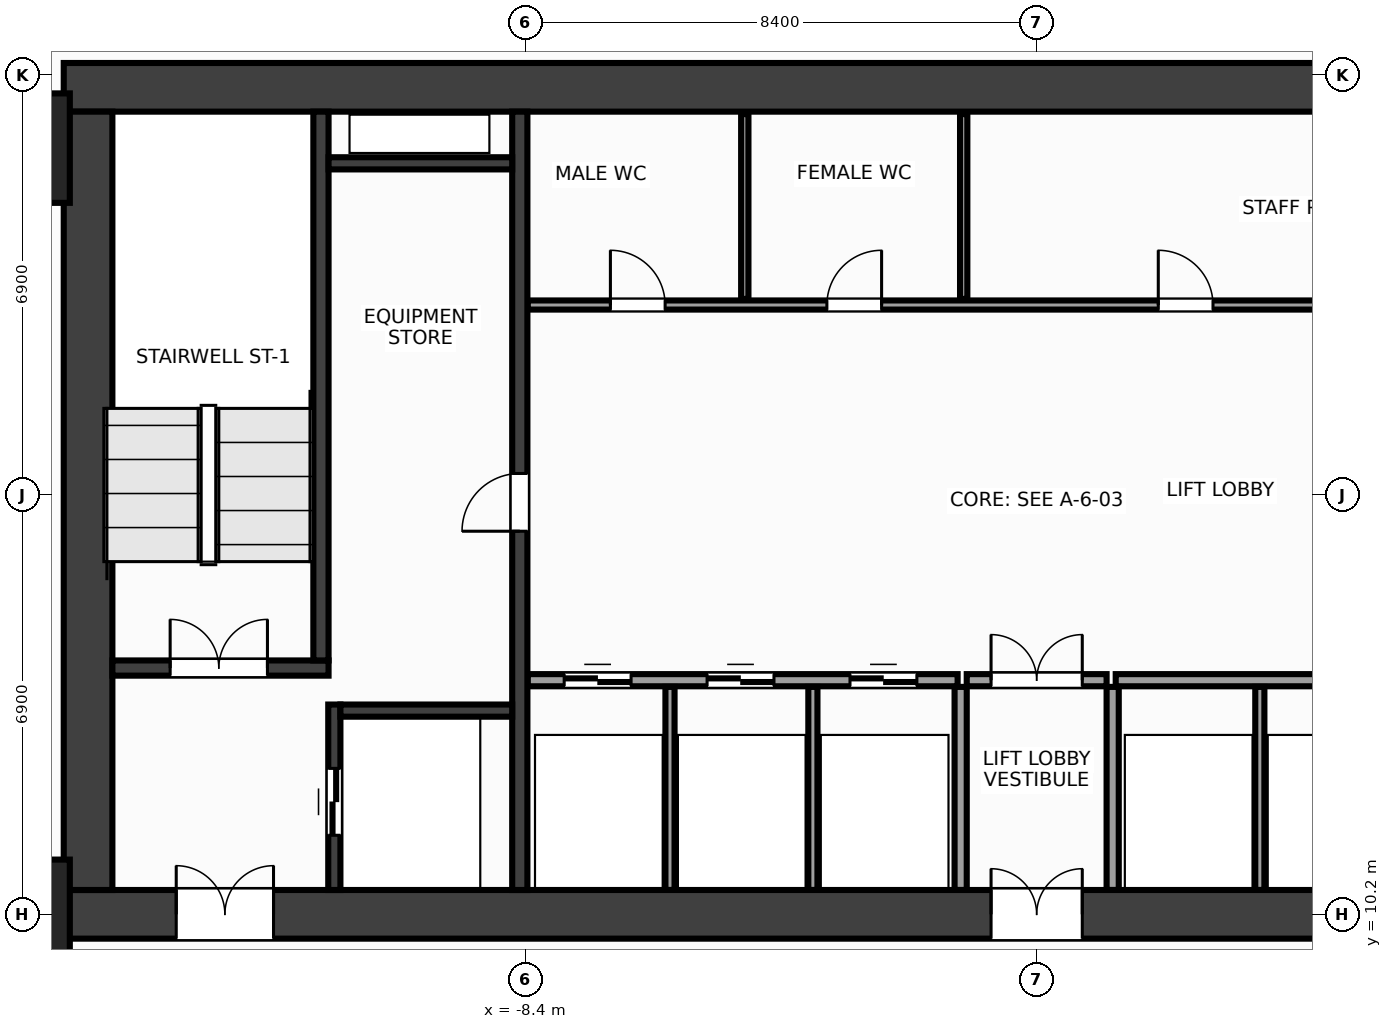
"""IFC4 building model, lengths in metres.
Left out: names, types, materials, properties, quantities, classifications, styles, units other than length and angle.
Written with IfcOpenShell. Run it as: python <this file> out.ifc"""

import sys

from ifc_helpers import new_model, si_unit, direction, frame, frame_2d, origin, origin_2d, place, context, subcontext, project, spatial, rectangle, extrude, source, transform, mapped, element, fill, save


model = new_model("IFC4")
c1 = context("Model", 3, precision=1e-05, world=origin(), true_north=direction((0.0, 1.0)))
c2 = subcontext(c1, "Body", "Model", "MODEL_VIEW")
j1 = project(units=[si_unit("LENGTHUNIT", "METRE"), si_unit("PLANEANGLEUNIT", "RADIAN")], contexts=[c1])
p1 = place(None, origin())
s1 = spatial("IfcSite", under=j1, at=p1, CompositionType="ELEMENT")
p2 = place(p1, origin())
s2 = spatial("IfcBuilding", under=s1, at=p2, CompositionType="ELEMENT")
p3 = place(p2, frame((0.0, 0.0, 66.8)))
s3 = spatial("IfcBuildingStorey", under=s2, at=p3, CompositionType="ELEMENT", Elevation=66.8)
m1 = source(origin(), c2, "Body", "SweptSolid", [
    extrude(rectangle(XDim=32.0, YDim=0.8, at=frame_2d((16.0, 0.0))), origin(), (0.0, 0.0, 1.0), 3.6),
])
p4 = place(p3, frame((-16.0, 23.8, 0.0), z_axis=(0.0, 0.0, 1.0), x_axis=(1.0, 0.0, 0.0)))
e1 = element("IfcWall", 1, at=p4, inside=s3, PredefinedType="SHEAR", context=c2, shape_type="MappedRepresentation", body=[
    mapped(m1, transform((0.0, 0.0, 0.0), x_axis=(1.0, 0.0, 0.0), y_axis=(0.0, 1.0, 0.0), z_axis=(0.0, 0.0, 1.0), scale=1.0)),
])
p5 = place(p3, frame((-16.0, 10.2, 0.0), z_axis=(0.0, 0.0, 1.0), x_axis=(1.0, 0.0, 0.0)))
e2 = element("IfcWall", 2, at=p5, inside=s3, PredefinedType="SHEAR", context=c2, shape_type="MappedRepresentation", body=[
    mapped(m1, transform((0.0, 0.0, 0.0), x_axis=(1.0, 0.0, 0.0), y_axis=(0.0, 1.0, 0.0), z_axis=(0.0, 0.0, 1.0), scale=1.0)),
])
p6 = place(p5, frame((1.85, 0.0, 0.0)))
e3 = element("IfcOpeningElement", 3, at=p6, cuts=e2, PredefinedType="OPENING", context=c2, shape_type="SweptSolid", body=[
    extrude(rectangle(XDim=1.6, YDim=2.15, at=frame_2d((0.8, 1.075))), frame((0.0, 0.412, 0.0), z_axis=(0.0, -1.0, 0.0), x_axis=(1.0, 0.0, 0.0)), (0.0, 0.0, 1.0), 0.824),
])
p7 = place(p5, frame((28.55, 0.0, 0.0)))
e4 = element("IfcOpeningElement", 4, at=p7, cuts=e2, PredefinedType="OPENING", context=c2, shape_type="SweptSolid", body=[
    extrude(rectangle(XDim=1.6, YDim=2.15, at=frame_2d((0.8, 1.075))), frame((0.0, 0.412, 0.0), z_axis=(0.0, -1.0, 0.0), x_axis=(1.0, 0.0, 0.0)), (0.0, 0.0, 1.0), 0.824),
])
p8 = place(p5, frame((15.25, 0.0, 0.0)))
e5 = element("IfcOpeningElement", 5, at=p8, cuts=e2, PredefinedType="OPENING", context=c2, shape_type="SweptSolid", body=[
    extrude(rectangle(XDim=1.5, YDim=2.2, at=frame_2d((0.75, 1.1))), frame((0.0, 0.412, 0.0), z_axis=(0.0, -1.0, 0.0), x_axis=(1.0, 0.0, 0.0)), (0.0, 0.0, 1.0), 0.824),
])
m2 = source(origin(), c2, "Body", "SweptSolid", [
    extrude(rectangle(XDim=12.8, YDim=0.8, at=frame_2d((6.4, 0.0))), origin(), (0.0, 0.0, 1.0), 3.6),
])
p9 = place(p3, frame((-15.6, 10.6, 0.0), z_axis=(0.0, 0.0, 1.0), x_axis=(0.0, 1.0, 0.0)))
e6 = element("IfcWall", 6, at=p9, inside=s3, PredefinedType="SHEAR", context=c2, shape_type="MappedRepresentation", body=[
    mapped(m2, transform((0.0, 0.0, 0.0), x_axis=(1.0, 0.0, 0.0), y_axis=(0.0, 1.0, 0.0), z_axis=(0.0, 0.0, 1.0), scale=1.0)),
])
m3 = source(origin(), c2, "Body", "SweptSolid", [
    extrude(rectangle(XDim=12.8, YDim=0.25, at=frame_2d((6.4, 0.0))), origin(), (0.0, 0.0, 1.0), 3.6),
])
p10 = place(p3, frame((-8.5, 10.6, 0.0), z_axis=(0.0, 0.0, 1.0), x_axis=(0.0, 1.0, 0.0)))
e7 = element("IfcWall", 7, at=p10, inside=s3, PredefinedType="SHEAR", context=c2, shape_type="MappedRepresentation", body=[
    mapped(m3, transform((0.0, 0.0, 0.0), x_axis=(1.0, 0.0, 0.0), y_axis=(0.0, 1.0, 0.0), z_axis=(0.0, 0.0, 1.0), scale=1.0)),
])
p11 = place(p10, frame((5.9, 0.0, 0.0)))
e8 = element("IfcOpeningElement", 8, at=p11, cuts=e7, PredefinedType="OPENING", context=c2, shape_type="SweptSolid", body=[
    extrude(rectangle(XDim=0.95, YDim=2.15, at=frame_2d((0.475, 1.075))), frame((0.0, 0.137, 0.0), z_axis=(0.0, -1.0, 0.0), x_axis=(1.0, 0.0, 0.0)), (0.0, 0.0, 1.0), 0.274),
])
m4 = source(origin(), c2, "Body", "SweptSolid", [
    extrude(rectangle(XDim=3.555, YDim=0.25, at=frame_2d((1.777, 0.0))), origin(), (0.0, 0.0, 1.0), 3.6),
])
p12 = place(p3, frame((-15.2, 14.25, 0.0), z_axis=(0.0, 0.0, 1.0), x_axis=(1.0, 0.0, 0.0)))
e9 = element("IfcWall", 9, at=p12, inside=s3, PredefinedType="SHEAR", context=c2, shape_type="MappedRepresentation", body=[
    mapped(m4, transform((0.0, 0.0, 0.0), x_axis=(1.0, 0.0, 0.0), y_axis=(0.0, 1.0, 0.0), z_axis=(0.0, 0.0, 1.0), scale=1.0)),
])
p13 = place(p12, frame((0.95, 0.0, 0.0)))
e10 = element("IfcOpeningElement", 10, at=p13, cuts=e9, PredefinedType="OPENING", context=c2, shape_type="SweptSolid", body=[
    extrude(rectangle(XDim=1.6, YDim=2.15, at=frame_2d((0.8, 1.075))), frame((0.0, 0.137, 0.0), z_axis=(0.0, -1.0, 0.0), x_axis=(1.0, 0.0, 0.0)), (0.0, 0.0, 1.0), 0.274),
])
m5 = source(origin(), c2, "Body", "SweptSolid", [
    extrude(rectangle(XDim=9.025, YDim=0.25, at=frame_2d((4.512, 0.0))), origin(), (0.0, 0.0, 1.0), 3.6),
])
p14 = place(p3, frame((-11.77, 14.375, 0.0), z_axis=(0.0, 0.0, 1.0), x_axis=(0.0, 1.0, 0.0)))
e11 = element("IfcWall", 11, at=p14, inside=s3, PredefinedType="SHEAR", context=c2, shape_type="MappedRepresentation", body=[
    mapped(m5, transform((0.0, 0.0, 0.0), x_axis=(1.0, 0.0, 0.0), y_axis=(0.0, 1.0, 0.0), z_axis=(0.0, 0.0, 1.0), scale=1.0)),
])
m6 = source(origin(), c2, "Body", "SweptSolid", [
    extrude(rectangle(XDim=3.05, YDim=0.2, at=frame_2d((1.525, 0.0))), origin(), (0.0, 0.0, 1.0), 3.6),
])
p15 = place(p3, frame((-11.55, 10.6, 0.0), z_axis=(0.0, 0.0, 1.0), x_axis=(0.0, 1.0, 0.0)))
e12 = element("IfcWall", 12, at=p15, inside=s3, PredefinedType="SHEAR", context=c2, shape_type="MappedRepresentation", body=[
    mapped(m6, transform((0.0, 0.0, 0.0), x_axis=(1.0, 0.0, 0.0), y_axis=(0.0, 1.0, 0.0), z_axis=(0.0, 0.0, 1.0), scale=1.0)),
])
p16 = place(p15, frame((0.9, 0.0, 0.0)))
e13 = element("IfcOpeningElement", 13, at=p16, cuts=e12, PredefinedType="OPENING", context=c2, shape_type="SweptSolid", body=[
    extrude(rectangle(XDim=1.1, YDim=2.15, at=frame_2d((0.55, 1.075))), frame((0.0, 0.112, 0.0), z_axis=(0.0, -1.0, 0.0), x_axis=(1.0, 0.0, 0.0)), (0.0, 0.0, 1.0), 0.224),
])
m7 = source(origin(), c2, "Body", "SweptSolid", [
    extrude(rectangle(XDim=2.825, YDim=0.2, at=frame_2d((1.413, 0.0))), origin(), (0.0, 0.0, 1.0), 3.6),
])
p17 = place(p3, frame((-11.45, 13.55, 0.0), z_axis=(0.0, 0.0, 1.0), x_axis=(1.0, 0.0, 0.0)))
e14 = element("IfcWall", 14, at=p17, inside=s3, PredefinedType="SHEAR", context=c2, shape_type="MappedRepresentation", body=[
    mapped(m7, transform((0.0, 0.0, 0.0), x_axis=(1.0, 0.0, 0.0), y_axis=(0.0, 1.0, 0.0), z_axis=(0.0, 0.0, 1.0), scale=1.0)),
])
m8 = source(origin(), c2, "Body", "SweptSolid", [
    extrude(rectangle(XDim=3.02, YDim=0.2, at=frame_2d((1.51, 0.0))), origin(), (0.0, 0.0, 1.0), 3.6),
])
p18 = place(p3, frame((-11.645, 22.55, 0.0), z_axis=(0.0, 0.0, 1.0), x_axis=(1.0, 0.0, 0.0)))
e15 = element("IfcWall", 15, at=p18, inside=s3, PredefinedType="SHEAR", context=c2, shape_type="MappedRepresentation", body=[
    mapped(m8, transform((0.0, 0.0, 0.0), x_axis=(1.0, 0.0, 0.0), y_axis=(0.0, 1.0, 0.0), z_axis=(0.0, 0.0, 1.0), scale=1.0)),
])
m9 = source(origin(), c2, "Body", "SweptSolid", [
    extrude(rectangle(XDim=1.8, YDim=1.8, at=origin_2d()), origin(), (0.0, 0.0, 1.0), 3.6),
])
for number, where, z_axis, x_axis in (
    (16, (-16.8, 10.2, 0.0), (0.0, 0.0, 1.0), (1.0, 0.0, 0.0)),
    (17, (-16.8, 22.8, 0.0), (0.0, 0.0, 1.0), (1.0, 0.0, 0.0)),
):
    element("IfcColumn", number, at=place(p3, frame(where, z_axis=z_axis, x_axis=x_axis)), inside=s3, PredefinedType="COLUMN", context=c2, shape_type="MappedRepresentation", body=[
        mapped(m9, transform((0.0, 0.0, 0.0), x_axis=(1.0, 0.0, 0.0), y_axis=(0.0, 1.0, 0.0), z_axis=(0.0, 0.0, 1.0), scale=1.0)),
    ])
m10 = source(origin(), c2, "Body", "SweptSolid", [
    extrude(rectangle(XDim=7.07, YDim=0.2, at=frame_2d((3.535, 0.0))), origin(), (0.0, 0.0, 1.0), 3.3),
])
p19 = place(p3, frame((-8.37, 14.05, 0.0), z_axis=(0.0, 0.0, 1.0), x_axis=(1.0, 0.0, 0.0)))
e18 = element("IfcWall", 18, at=p19, inside=s3, PredefinedType="PARTITIONING", context=c2, shape_type="MappedRepresentation", body=[
    mapped(m10, transform((0.0, 0.0, 0.0), x_axis=(1.0, 0.0, 0.0), y_axis=(0.0, 1.0, 0.0), z_axis=(0.0, 0.0, 1.0), scale=1.0)),
])
p20 = place(p19, frame((0.6, 0.0, 0.0)))
e19 = element("IfcOpeningElement", 19, at=p20, cuts=e18, PredefinedType="OPENING", context=c2, shape_type="SweptSolid", body=[
    extrude(rectangle(XDim=1.1, YDim=2.15, at=frame_2d((0.55, 1.075))), frame((0.0, 0.112, 0.0), z_axis=(0.0, -1.0, 0.0), x_axis=(1.0, 0.0, 0.0)), (0.0, 0.0, 1.0), 0.224),
])
p21 = place(p19, frame((2.95, 0.0, 0.0)))
e20 = element("IfcOpeningElement", 20, at=p21, cuts=e18, PredefinedType="OPENING", context=c2, shape_type="SweptSolid", body=[
    extrude(rectangle(XDim=1.1, YDim=2.15, at=frame_2d((0.55, 1.075))), frame((0.0, 0.112, 0.0), z_axis=(0.0, -1.0, 0.0), x_axis=(1.0, 0.0, 0.0)), (0.0, 0.0, 1.0), 0.224),
])
p22 = place(p19, frame((5.3, 0.0, 0.0)))
e21 = element("IfcOpeningElement", 21, at=p22, cuts=e18, PredefinedType="OPENING", context=c2, shape_type="SweptSolid", body=[
    extrude(rectangle(XDim=1.1, YDim=2.15, at=frame_2d((0.55, 1.075))), frame((0.0, 0.112, 0.0), z_axis=(0.0, -1.0, 0.0), x_axis=(1.0, 0.0, 0.0)), (0.0, 0.0, 1.0), 0.224),
])
p23 = place(p3, frame((1.3, 14.05, 0.0), z_axis=(0.0, 0.0, 1.0), x_axis=(1.0, 0.0, 0.0)))
e22 = element("IfcWall", 22, at=p23, inside=s3, PredefinedType="PARTITIONING", context=c2, shape_type="MappedRepresentation", body=[
    mapped(m10, transform((0.0, 0.0, 0.0), x_axis=(1.0, 0.0, 0.0), y_axis=(0.0, 1.0, 0.0), z_axis=(0.0, 0.0, 1.0), scale=1.0)),
])
m11 = source(origin(), c2, "Body", "SweptSolid", [
    extrude(rectangle(XDim=3.34, YDim=0.2, at=frame_2d((1.67, 0.0))), origin(), (0.0, 0.0, 1.0), 3.3),
])
for number, where, z_axis, x_axis in (
    (23, (-1.25, 10.6, 0.0), (0.0, 0.0, 1.0), (0.0, 1.0, 0.0)),
    (24, (1.25, 10.6, 0.0), (0.0, 0.0, 1.0), (0.0, 1.0, 0.0)),
):
    element("IfcWall", number, at=place(p3, frame(where, z_axis=z_axis, x_axis=x_axis)), inside=s3, PredefinedType="PARTITIONING", context=c2, shape_type="MappedRepresentation", body=[
        mapped(m11, transform((0.0, 0.0, 0.0), x_axis=(1.0, 0.0, 0.0), y_axis=(0.0, 1.0, 0.0), z_axis=(0.0, 0.0, 1.0), scale=1.0)),
    ])
m12 = source(origin(), c2, "Body", "SweptSolid", [
    extrude(rectangle(XDim=2.3, YDim=0.2, at=frame_2d((1.15, 0.0))), origin(), (0.0, 0.0, 1.0), 3.3),
])
p24 = place(p3, frame((-1.15, 14.05, 0.0), z_axis=(0.0, 0.0, 1.0), x_axis=(1.0, 0.0, 0.0)))
e25 = element("IfcWall", 25, at=p24, inside=s3, PredefinedType="PARTITIONING", context=c2, shape_type="MappedRepresentation", body=[
    mapped(m12, transform((0.0, 0.0, 0.0), x_axis=(1.0, 0.0, 0.0), y_axis=(0.0, 1.0, 0.0), z_axis=(0.0, 0.0, 1.0), scale=1.0)),
])
p25 = place(p24, frame((0.4, 0.0, 0.0)))
e26 = element("IfcOpeningElement", 26, at=p25, cuts=e25, PredefinedType="OPENING", context=c2, shape_type="SweptSolid", body=[
    extrude(rectangle(XDim=1.5, YDim=2.2, at=frame_2d((0.75, 1.1))), frame((0.0, 0.112, 0.0), z_axis=(0.0, -1.0, 0.0), x_axis=(1.0, 0.0, 0.0)), (0.0, 0.0, 1.0), 0.224),
])
m13 = source(origin(), c2, "Body", "SweptSolid", [
    extrude(rectangle(XDim=14.59, YDim=0.15, at=frame_2d((7.295, 0.0))), origin(), (0.0, 0.0, 1.0), 3.3),
])
p26 = place(p3, frame((-8.37, 20.22, 0.0), z_axis=(0.0, 0.0, 1.0), x_axis=(1.0, 0.0, 0.0)))
e27 = element("IfcWall", 27, at=p26, inside=s3, PredefinedType="PARTITIONING", context=c2, shape_type="MappedRepresentation", body=[
    mapped(m13, transform((0.0, 0.0, 0.0), x_axis=(1.0, 0.0, 0.0), y_axis=(0.0, 1.0, 0.0), z_axis=(0.0, 0.0, 1.0), scale=1.0)),
])
p27 = place(p26, frame((1.36, 0.0, 0.0)))
e28 = element("IfcOpeningElement", 28, at=p27, cuts=e27, PredefinedType="OPENING", context=c2, shape_type="SweptSolid", body=[
    extrude(rectangle(XDim=0.9, YDim=2.15, at=frame_2d((0.45, 1.075))), frame((0.0, 0.087, 0.0), z_axis=(0.0, -1.0, 0.0), x_axis=(1.0, 0.0, 0.0)), (0.0, 0.0, 1.0), 0.174),
])
p28 = place(p26, frame((4.92, 0.0, 0.0)))
e29 = element("IfcOpeningElement", 29, at=p28, cuts=e27, PredefinedType="OPENING", context=c2, shape_type="SweptSolid", body=[
    extrude(rectangle(XDim=0.9, YDim=2.15, at=frame_2d((0.45, 1.075))), frame((0.0, 0.087, 0.0), z_axis=(0.0, -1.0, 0.0), x_axis=(1.0, 0.0, 0.0)), (0.0, 0.0, 1.0), 0.174),
])
p29 = place(p26, frame((10.37, 0.0, 0.0)))
e30 = element("IfcOpeningElement", 30, at=p29, cuts=e27, PredefinedType="OPENING", context=c2, shape_type="SweptSolid", body=[
    extrude(rectangle(XDim=0.9, YDim=2.15, at=frame_2d((0.45, 1.075))), frame((0.0, 0.087, 0.0), z_axis=(0.0, -1.0, 0.0), x_axis=(1.0, 0.0, 0.0)), (0.0, 0.0, 1.0), 0.174),
])
m14 = source(origin(), c2, "Body", "SweptSolid", [
    extrude(rectangle(XDim=3.34, YDim=0.15, at=frame_2d((1.67, 0.0))), origin(), (0.0, 0.0, 1.0), 3.3),
])
for number, where, z_axis, x_axis in (
    (31, (-6.03, 10.6, 0.0), (0.0, 0.0, 1.0), (0.0, 1.0, 0.0)),
    (32, (-3.68, 10.6, 0.0), (0.0, 0.0, 1.0), (0.0, 1.0, 0.0)),
    (33, (3.67, 10.6, 0.0), (0.0, 0.0, 1.0), (0.0, 1.0, 0.0)),
):
    element("IfcWall", number, at=place(p3, frame(where, z_axis=z_axis, x_axis=x_axis)), inside=s3, PredefinedType="PARTITIONING", context=c2, shape_type="MappedRepresentation", body=[
        mapped(m14, transform((0.0, 0.0, 0.0), x_axis=(1.0, 0.0, 0.0), y_axis=(0.0, 1.0, 0.0), z_axis=(0.0, 0.0, 1.0), scale=1.0)),
    ])
m15 = source(origin(), c2, "Body", "SweptSolid", [
    extrude(rectangle(XDim=3.04, YDim=0.12, at=frame_2d((1.52, 0.0))), origin(), (0.0, 0.0, 1.0), 3.3),
])
for number, where, z_axis, x_axis in (
    (34, (-4.8, 20.32, 0.0), (0.0, 0.0, 1.0), (0.0, 1.0, 0.0)),
    (35, (-1.2, 20.32, 0.0), (0.0, 0.0, 1.0), (0.0, 1.0, 0.0)),
):
    element("IfcWall", number, at=place(p3, frame(where, z_axis=z_axis, x_axis=x_axis)), inside=s3, PredefinedType="PARTITIONING", context=c2, shape_type="MappedRepresentation", body=[
        mapped(m15, transform((0.0, 0.0, 0.0), x_axis=(1.0, 0.0, 0.0), y_axis=(0.0, 1.0, 0.0), z_axis=(0.0, 0.0, 1.0), scale=1.0)),
    ])
m16 = source(origin(), c2, "Body", "SweptSolid", [
    extrude(rectangle(XDim=1.6, YDim=2.15, at=frame_2d((0.8, 1.075))), frame((0.0, 0.025, 0.0), z_axis=(0.0, -1.0, 0.0), x_axis=(1.0, 0.0, 0.0)), (0.0, 0.0, 1.0), 0.05),
])
p30 = place(p13, origin())
e36 = element("IfcDoor", 36, at=p30, inside=s3, OperationType="DOUBLE_DOOR_SINGLE_SWING", PredefinedType="DOOR", context=c2, shape_type="MappedRepresentation", body=[
    mapped(m16, transform((0.0, 0.0, 0.0), x_axis=(1.0, 0.0, 0.0), y_axis=(0.0, 1.0, 0.0), z_axis=(0.0, 0.0, 1.0), scale=1.0)),
])
fill(e10, e36)
p31 = place(p6, origin())
e37 = element("IfcDoor", 37, at=p31, inside=s3, OperationType="DOUBLE_DOOR_SINGLE_SWING", PredefinedType="DOOR", context=c2, shape_type="MappedRepresentation", body=[
    mapped(m16, transform((0.0, 0.0, 0.0), x_axis=(1.0, 0.0, 0.0), y_axis=(0.0, 1.0, 0.0), z_axis=(0.0, 0.0, 1.0), scale=1.0)),
])
fill(e3, e37)
m17 = source(origin(), c2, "Body", "SweptSolid", [
    extrude(rectangle(XDim=1.1, YDim=2.15, at=frame_2d((0.55, 1.075))), frame((0.0, 0.025, 0.0), z_axis=(0.0, -1.0, 0.0), x_axis=(1.0, 0.0, 0.0)), (0.0, 0.0, 1.0), 0.05),
])
p32 = place(p16, origin())
e38 = element("IfcDoor", 38, at=p32, inside=s3, OperationType="DOUBLE_DOOR_SLIDING", PredefinedType="DOOR", context=c2, shape_type="MappedRepresentation", body=[
    mapped(m17, transform((0.0, 0.0, 0.0), x_axis=(1.0, 0.0, 0.0), y_axis=(0.0, 1.0, 0.0), z_axis=(0.0, 0.0, 1.0), scale=1.0)),
])
fill(e13, e38)
m18 = source(origin(), c2, "Body", "SweptSolid", [
    extrude(rectangle(XDim=0.95, YDim=2.15, at=frame_2d((0.475, 1.075))), frame((0.0, 0.025, 0.0), z_axis=(0.0, -1.0, 0.0), x_axis=(1.0, 0.0, 0.0)), (0.0, 0.0, 1.0), 0.05),
])
p33 = place(p11, origin())
e39 = element("IfcDoor", 39, at=p33, inside=s3, OperationType="SINGLE_SWING_LEFT", PredefinedType="DOOR", context=c2, shape_type="MappedRepresentation", body=[
    mapped(m18, transform((0.0, 0.0, 0.0), x_axis=(1.0, 0.0, 0.0), y_axis=(0.0, 1.0, 0.0), z_axis=(0.0, 0.0, 1.0), scale=1.0)),
])
fill(e8, e39)
p34 = place(p20, origin())
e40 = element("IfcDoor", 40, at=p34, inside=s3, OperationType="DOUBLE_DOOR_SLIDING", PredefinedType="DOOR", context=c2, shape_type="MappedRepresentation", body=[
    mapped(m17, transform((0.0, 0.0, 0.0), x_axis=(1.0, 0.0, 0.0), y_axis=(0.0, 1.0, 0.0), z_axis=(0.0, 0.0, 1.0), scale=1.0)),
])
fill(e19, e40)
p35 = place(p21, origin())
e41 = element("IfcDoor", 41, at=p35, inside=s3, OperationType="DOUBLE_DOOR_SLIDING", PredefinedType="DOOR", context=c2, shape_type="MappedRepresentation", body=[
    mapped(m17, transform((0.0, 0.0, 0.0), x_axis=(1.0, 0.0, 0.0), y_axis=(0.0, 1.0, 0.0), z_axis=(0.0, 0.0, 1.0), scale=1.0)),
])
fill(e20, e41)
p36 = place(p22, origin())
e42 = element("IfcDoor", 42, at=p36, inside=s3, OperationType="DOUBLE_DOOR_SLIDING", PredefinedType="DOOR", context=c2, shape_type="MappedRepresentation", body=[
    mapped(m17, transform((0.0, 0.0, 0.0), x_axis=(1.0, 0.0, 0.0), y_axis=(0.0, 1.0, 0.0), z_axis=(0.0, 0.0, 1.0), scale=1.0)),
])
fill(e21, e42)
m19 = source(origin(), c2, "Body", "SweptSolid", [
    extrude(rectangle(XDim=1.5, YDim=2.2, at=frame_2d((0.75, 1.1))), frame((0.0, 0.025, 0.0), z_axis=(0.0, -1.0, 0.0), x_axis=(1.0, 0.0, 0.0)), (0.0, 0.0, 1.0), 0.05),
])
p37 = place(p25, origin())
e43 = element("IfcDoor", 43, at=p37, inside=s3, OperationType="DOUBLE_DOOR_SINGLE_SWING", PredefinedType="DOOR", context=c2, shape_type="MappedRepresentation", body=[
    mapped(m19, transform((0.0, 0.0, 0.0), x_axis=(1.0, 0.0, 0.0), y_axis=(0.0, 1.0, 0.0), z_axis=(0.0, 0.0, 1.0), scale=1.0)),
])
fill(e26, e43)
p38 = place(p8, origin())
e44 = element("IfcDoor", 44, at=p38, inside=s3, OperationType="DOUBLE_DOOR_SINGLE_SWING", PredefinedType="DOOR", context=c2, shape_type="MappedRepresentation", body=[
    mapped(m19, transform((0.0, 0.0, 0.0), x_axis=(1.0, 0.0, 0.0), y_axis=(0.0, 1.0, 0.0), z_axis=(0.0, 0.0, 1.0), scale=1.0)),
])
fill(e5, e44)
m20 = source(origin(), c2, "Body", "SweptSolid", [
    extrude(rectangle(XDim=0.9, YDim=2.15, at=frame_2d((0.45, 1.075))), frame((0.0, 0.025, 0.0), z_axis=(0.0, -1.0, 0.0), x_axis=(1.0, 0.0, 0.0)), (0.0, 0.0, 1.0), 0.05),
])
p39 = place(p27, origin())
e45 = element("IfcDoor", 45, at=p39, inside=s3, OperationType="SINGLE_SWING_LEFT", PredefinedType="DOOR", context=c2, shape_type="MappedRepresentation", body=[
    mapped(m20, transform((0.0, 0.0, 0.0), x_axis=(1.0, 0.0, 0.0), y_axis=(0.0, 1.0, 0.0), z_axis=(0.0, 0.0, 1.0), scale=1.0)),
])
fill(e28, e45)
p40 = place(p28, origin())
e46 = element("IfcDoor", 46, at=p40, inside=s3, OperationType="SINGLE_SWING_RIGHT", PredefinedType="DOOR", context=c2, shape_type="MappedRepresentation", body=[
    mapped(m20, transform((0.0, 0.0, 0.0), x_axis=(1.0, 0.0, 0.0), y_axis=(0.0, 1.0, 0.0), z_axis=(0.0, 0.0, 1.0), scale=1.0)),
])
fill(e29, e46)
p41 = place(p29, origin())
e47 = element("IfcDoor", 47, at=p41, inside=s3, OperationType="SINGLE_SWING_LEFT", PredefinedType="DOOR", context=c2, shape_type="MappedRepresentation", body=[
    mapped(m20, transform((0.0, 0.0, 0.0), x_axis=(1.0, 0.0, 0.0), y_axis=(0.0, 1.0, 0.0), z_axis=(0.0, 0.0, 1.0), scale=1.0)),
])
fill(e30, e47)
save(model, sys.argv[1])
